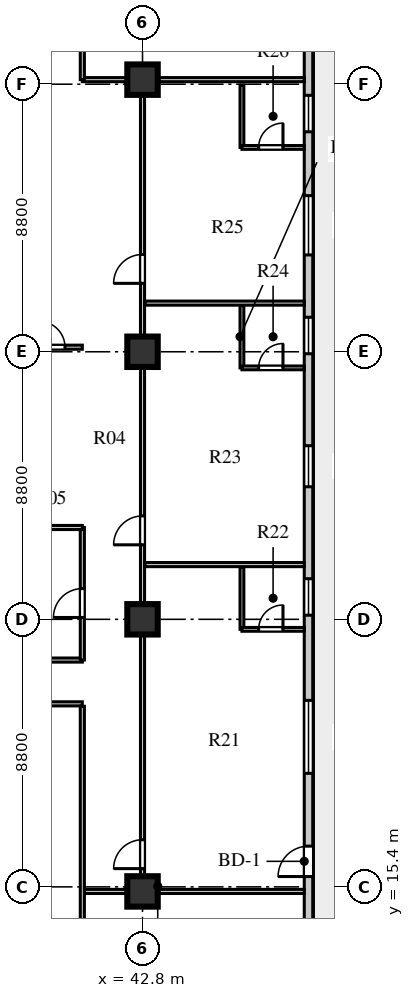
"""IFC4 building model, lengths in metres.
Left out: names, types, materials, properties, quantities, classifications, styles, units other than length and angle.
Written with IfcOpenShell. Run it as: python <this file> out.ifc"""

import sys

from ifc_helpers import new_model, si_unit, direction, frame, frame_2d, origin, origin_2d, place, context, subcontext, project, spatial, rectangle, extrude, element, fill, save


model = new_model("IFC4")
c1 = context("Model", 3, precision=1e-05, world=origin(), true_north=direction((0.0, 1.0)))
c2 = subcontext(c1, "Body", "Model", "MODEL_VIEW")
j1 = project(units=[si_unit("LENGTHUNIT", "METRE"), si_unit("PLANEANGLEUNIT", "RADIAN")], contexts=[c1])
p1 = place(None, origin())
s1 = spatial("IfcSite", under=j1, at=p1, CompositionType="ELEMENT")
p2 = place(p1, origin())
s2 = spatial("IfcBuilding", under=s1, at=p2, CompositionType="ELEMENT")
p3 = place(p2, frame((0.0, 0.0, 119.4)))
s3 = spatial("IfcBuildingStorey", under=s2, at=p3, CompositionType="ELEMENT", Elevation=119.4)
for number, where, z_axis, x_axis in (
    (1, (42.8, 15.25, 0.0), (0.0, 0.0, 1.0), (1.0, 0.0, 0.0)),
    (2, (42.8, 24.2, 0.0), (0.0, 0.0, 1.0), (1.0, 0.0, 0.0)),
    (3, (42.8, 33.0, 0.0), (0.0, 0.0, 1.0), (1.0, 0.0, 0.0)),
    (4, (42.8, 41.95, 0.0), (0.0, 0.0, 1.0), (1.0, 0.0, 0.0)),
):
    element("IfcColumn", number, at=place(p3, frame(where, z_axis=z_axis, x_axis=x_axis)), inside=s3, PredefinedType="COLUMN", context=c2, shape_type="SweptSolid", body=[
        extrude(rectangle(XDim=1.0, YDim=1.0, at=origin_2d()), origin(), (0.0, 0.0, 1.0), 3.6),
    ])
p4 = place(p3, frame((48.26, 13.33, 0.0), z_axis=(0.0, 0.0, 1.0), x_axis=(0.0, 1.0, 0.0)))
e5 = element("IfcWall", 5, at=p4, inside=s3, PredefinedType="STANDARD", context=c2, shape_type="SweptSolid", body=[
    extrude(rectangle(XDim=30.54, YDim=0.28, at=frame_2d((15.27, 0.0))), origin(), (0.0, 0.0, 1.0), 3.6),
])
p5 = place(p4, frame((2.41, 0.0, 0.0)))
e6 = element("IfcOpeningElement", 6, at=p5, cuts=e5, PredefinedType="OPENING", context=c2, shape_type="SweptSolid", body=[
    extrude(rectangle(XDim=1.0, YDim=2.05, at=frame_2d((0.5, 1.025))), frame((0.0, 0.15, 0.0), z_axis=(0.0, -1.0, 0.0), x_axis=(1.0, 0.0, 0.0)), (0.0, 0.0, 1.0), 0.3),
])
p6 = place(p4, frame((5.805, 0.0, 0.8)))
e7 = element("IfcOpeningElement", 7, at=p6, cuts=e5, PredefinedType="OPENING", context=c2, shape_type="SweptSolid", body=[
    extrude(rectangle(XDim=2.4, YDim=2.05, at=frame_2d((1.2, 1.025))), frame((0.0, 0.15, 0.0), z_axis=(0.0, -1.0, 0.0), x_axis=(1.0, 0.0, 0.0)), (0.0, 0.0, 1.0), 0.3),
])
p7 = place(p4, frame((11.005, 0.0, 0.8)))
e8 = element("IfcOpeningElement", 8, at=p7, cuts=e5, PredefinedType="OPENING", context=c2, shape_type="SweptSolid", body=[
    extrude(rectangle(XDim=1.2, YDim=1.75, at=frame_2d((0.6, 0.875))), frame((0.0, 0.15, 0.0), z_axis=(0.0, -1.0, 0.0), x_axis=(1.0, 0.0, 0.0)), (0.0, 0.0, 1.0), 0.3),
])
p8 = place(p4, frame((15.23, 0.0, 0.8)))
e9 = element("IfcOpeningElement", 9, at=p8, cuts=e5, PredefinedType="OPENING", context=c2, shape_type="SweptSolid", body=[
    extrude(rectangle(XDim=1.35, YDim=1.9, at=frame_2d((0.675, 0.95))), frame((0.0, 0.15, 0.0), z_axis=(0.0, -1.0, 0.0), x_axis=(1.0, 0.0, 0.0)), (0.0, 0.0, 1.0), 0.3),
])
p9 = place(p4, frame((19.605, 0.0, 0.8)))
e10 = element("IfcOpeningElement", 10, at=p9, cuts=e5, PredefinedType="OPENING", context=c2, shape_type="SweptSolid", body=[
    extrude(rectangle(XDim=1.2, YDim=1.75, at=frame_2d((0.6, 0.875))), frame((0.0, 0.15, 0.0), z_axis=(0.0, -1.0, 0.0), x_axis=(1.0, 0.0, 0.0)), (0.0, 0.0, 1.0), 0.3),
])
p10 = place(p4, frame((22.855, 0.0, 0.8)))
e11 = element("IfcOpeningElement", 11, at=p10, cuts=e5, PredefinedType="OPENING", context=c2, shape_type="SweptSolid", body=[
    extrude(rectangle(XDim=1.95, YDim=2.0, at=frame_2d((0.975, 1.0))), frame((0.0, 0.15, 0.0), z_axis=(0.0, -1.0, 0.0), x_axis=(1.0, 0.0, 0.0)), (0.0, 0.0, 1.0), 0.3),
])
p11 = place(p4, frame((26.905, 0.0, 0.8)))
e12 = element("IfcOpeningElement", 12, at=p11, cuts=e5, PredefinedType="OPENING", context=c2, shape_type="SweptSolid", body=[
    extrude(rectangle(XDim=1.2, YDim=1.75, at=frame_2d((0.6, 0.875))), frame((0.0, 0.15, 0.0), z_axis=(0.0, -1.0, 0.0), x_axis=(1.0, 0.0, 0.0)), (0.0, 0.0, 1.0), 0.3),
])
p12 = place(p3, frame((25.22, 21.42, 0.0), z_axis=(0.0, 0.0, 1.0), x_axis=(1.0, 0.0, 0.0)))
e13 = element("IfcWall", 13, at=p12, inside=s3, PredefinedType="PARTITIONING", context=c2, shape_type="SweptSolid", body=[
    extrude(rectangle(XDim=15.6, YDim=0.135, at=frame_2d((7.8, 0.0))), origin(), (0.0, 0.0, 1.0), 3.2),
])
p13 = place(p12, frame((0.73, 0.0, 0.0)))
e14 = element("IfcOpeningElement", 14, at=p13, cuts=e13, PredefinedType="OPENING", context=c2, shape_type="SweptSolid", body=[
    extrude(rectangle(XDim=0.95, YDim=2.1, at=frame_2d((0.475, 1.05))), frame((0.0, 0.078, 0.0), z_axis=(0.0, -1.0, 0.0), x_axis=(1.0, 0.0, 0.0)), (0.0, 0.0, 1.0), 0.155),
])
p14 = place(p12, frame((8.43, 0.0, 0.0)))
e15 = element("IfcOpeningElement", 15, at=p14, cuts=e13, PredefinedType="OPENING", context=c2, shape_type="SweptSolid", body=[
    extrude(rectangle(XDim=0.95, YDim=2.1, at=frame_2d((0.475, 1.05))), frame((0.0, 0.078, 0.0), z_axis=(0.0, -1.0, 0.0), x_axis=(1.0, 0.0, 0.0)), (0.0, 0.0, 1.0), 0.155),
])
p15 = place(p3, frame((27.15, 22.86, 0.0), z_axis=(0.0, 0.0, 1.0), x_axis=(1.0, 0.0, 0.0)))
e16 = element("IfcWall", 16, at=p15, inside=s3, PredefinedType="PARTITIONING", context=c2, shape_type="SweptSolid", body=[
    extrude(rectangle(XDim=13.67, YDim=0.135, at=frame_2d((6.835, 0.0))), origin(), (0.0, 0.0, 1.0), 3.6),
])
p16 = place(p15, frame((2.2, 0.0, 0.0)))
e17 = element("IfcOpeningElement", 17, at=p16, cuts=e16, PredefinedType="OPENING", context=c2, shape_type="SweptSolid", body=[
    extrude(rectangle(XDim=0.9, YDim=2.08, at=frame_2d((0.45, 1.04))), frame((0.0, 0.078, 0.0), z_axis=(0.0, -1.0, 0.0), x_axis=(1.0, 0.0, 0.0)), (0.0, 0.0, 1.0), 0.155),
])
p17 = place(p3, frame((42.8, 15.25, 0.0), z_axis=(0.0, 0.0, 1.0), x_axis=(0.0, 1.0, 0.0)))
e18 = element("IfcWall", 18, at=p17, inside=s3, PredefinedType="PARTITIONING", context=c2, shape_type="SweptSolid", body=[
    extrude(rectangle(XDim=26.7, YDim=0.135, at=frame_2d((13.35, 0.0))), origin(), (0.0, 0.0, 1.0), 2.95),
])
p18 = place(p17, frame((0.75, 0.0, 0.0)))
e19 = element("IfcOpeningElement", 19, at=p18, cuts=e18, PredefinedType="OPENING", context=c2, shape_type="SweptSolid", body=[
    extrude(rectangle(XDim=0.95, YDim=2.1, at=frame_2d((0.475, 1.05))), frame((0.0, 0.078, 0.0), z_axis=(0.0, -1.0, 0.0), x_axis=(1.0, 0.0, 0.0)), (0.0, 0.0, 1.0), 0.155),
])
p19 = place(p17, frame((11.4, 0.0, 0.0)))
e20 = element("IfcOpeningElement", 20, at=p19, cuts=e18, PredefinedType="OPENING", context=c2, shape_type="SweptSolid", body=[
    extrude(rectangle(XDim=0.95, YDim=2.1, at=frame_2d((0.475, 1.05))), frame((0.0, 0.078, 0.0), z_axis=(0.0, -1.0, 0.0), x_axis=(1.0, 0.0, 0.0)), (0.0, 0.0, 1.0), 0.155),
])
p20 = place(p17, frame((20.0, 0.0, 0.0)))
e21 = element("IfcOpeningElement", 21, at=p20, cuts=e18, PredefinedType="OPENING", context=c2, shape_type="SweptSolid", body=[
    extrude(rectangle(XDim=0.95, YDim=2.1, at=frame_2d((0.475, 1.05))), frame((0.0, 0.078, 0.0), z_axis=(0.0, -1.0, 0.0), x_axis=(1.0, 0.0, 0.0)), (0.0, 0.0, 1.0), 0.155),
])
for number, where, z_axis, x_axis in (
    (22, (40.82, 15.25, 0.0), (0.0, 0.0, 1.0), (1.0, 0.0, 0.0)),
    (23, (40.82, 41.95, 0.0), (0.0, 0.0, 1.0), (1.0, 0.0, 0.0)),
):
    element("IfcWall", number, at=place(p3, frame(where, z_axis=z_axis, x_axis=x_axis)), inside=s3, PredefinedType="PARTITIONING", context=c2, shape_type="SweptSolid", body=[
        extrude(rectangle(XDim=7.3, YDim=0.135, at=frame_2d((3.65, 0.0))), origin(), (0.0, 0.0, 1.0), 2.95),
    ])
p21 = place(p3, frame((40.82, 22.86, 0.0), z_axis=(0.0, 0.0, 1.0), x_axis=(0.0, 1.0, 0.0)))
e24 = element("IfcWall", 24, at=p21, inside=s3, PredefinedType="PARTITIONING", context=c2, shape_type="SweptSolid", body=[
    extrude(rectangle(XDim=4.36, YDim=0.135, at=frame_2d((2.18, 0.0))), origin(), (0.0, 0.0, 1.0), 3.6),
])
p22 = place(p21, frame((1.4, 0.0, 0.0)))
e25 = element("IfcOpeningElement", 25, at=p22, cuts=e24, PredefinedType="OPENING", context=c2, shape_type="SweptSolid", body=[
    extrude(rectangle(XDim=0.95, YDim=2.1, at=frame_2d((0.475, 1.05))), frame((0.0, 0.078, 0.0), z_axis=(0.0, -1.0, 0.0), x_axis=(1.0, 0.0, 0.0)), (0.0, 0.0, 1.0), 0.155),
])
p23 = place(p3, frame((36.9, 27.22, 0.0), z_axis=(0.0, 0.0, 1.0), x_axis=(1.0, 0.0, 0.0)))
e26 = element("IfcWall", 26, at=p23, inside=s3, PredefinedType="PARTITIONING", context=c2, shape_type="SweptSolid", body=[
    extrude(rectangle(XDim=3.92, YDim=0.135, at=frame_2d((1.96, 0.0))), origin(), (0.0, 0.0, 1.0), 3.2),
])
p24 = place(p3, frame((40.82, 10.28, 0.0), z_axis=(0.0, 0.0, 1.0), x_axis=(0.0, 1.0, 0.0)))
e27 = element("IfcWall", 27, at=p24, inside=s3, PredefinedType="PARTITIONING", context=c2, shape_type="SweptSolid", body=[
    extrude(rectangle(XDim=11.06, YDim=0.135, at=frame_2d((5.53, 0.0))), origin(), (0.0, 0.0, 1.0), 3.6),
])
p25 = place(p3, frame((46.07, 23.87, 0.0), z_axis=(0.0, 0.0, 1.0), x_axis=(0.0, 1.0, 0.0)))
e28 = element("IfcWall", 28, at=p25, inside=s3, PredefinedType="PLUMBINGWALL", context=c2, shape_type="SweptSolid", body=[
    extrude(rectangle(XDim=2.05, YDim=0.125, at=frame_2d((1.025, 0.0))), origin(), (0.0, 0.0, 1.0), 3.6),
])
p26 = place(p3, frame((46.07, 23.87, 0.0), z_axis=(0.0, 0.0, 1.0), x_axis=(1.0, 0.0, 0.0)))
e29 = element("IfcWall", 29, at=p26, inside=s3, PredefinedType="PLUMBINGWALL", context=c2, shape_type="SweptSolid", body=[
    extrude(rectangle(XDim=2.05, YDim=0.125, at=frame_2d((1.025, 0.0))), origin(), (0.0, 0.0, 1.0), 3.1),
])
p27 = place(p26, frame((0.55, 0.0, 0.0)))
e30 = element("IfcOpeningElement", 30, at=p27, cuts=e29, PredefinedType="OPENING", context=c2, shape_type="SweptSolid", body=[
    extrude(rectangle(XDim=0.8, YDim=2.05, at=frame_2d((0.4, 1.025))), frame((0.0, 0.073, 0.0), z_axis=(0.0, -1.0, 0.0), x_axis=(1.0, 0.0, 0.0)), (0.0, 0.0, 1.0), 0.145),
])
p28 = place(p3, frame((42.88, 26.0, 0.0), z_axis=(0.0, 0.0, 1.0), x_axis=(1.0, 0.0, 0.0)))
e31 = element("IfcWall", 31, at=p28, inside=s3, PredefinedType="PARTITIONING", context=c2, shape_type="SweptSolid", body=[
    extrude(rectangle(XDim=5.24, YDim=0.135, at=frame_2d((2.62, 0.0))), origin(), (0.0, 0.0, 1.0), 3.6),
])
p29 = place(p3, frame((46.07, 32.47, 0.0), z_axis=(0.0, 0.0, 1.0), x_axis=(0.0, 1.0, 0.0)))
e32 = element("IfcWall", 32, at=p29, inside=s3, PredefinedType="PLUMBINGWALL", context=c2, shape_type="SweptSolid", body=[
    extrude(rectangle(XDim=2.05, YDim=0.125, at=frame_2d((1.025, 0.0))), origin(), (0.0, 0.0, 1.0), 3.6),
])
p30 = place(p3, frame((46.07, 32.47, 0.0), z_axis=(0.0, 0.0, 1.0), x_axis=(1.0, 0.0, 0.0)))
e33 = element("IfcWall", 33, at=p30, inside=s3, PredefinedType="PLUMBINGWALL", context=c2, shape_type="SweptSolid", body=[
    extrude(rectangle(XDim=2.05, YDim=0.125, at=frame_2d((1.025, 0.0))), origin(), (0.0, 0.0, 1.0), 3.6),
])
p31 = place(p30, frame((0.55, 0.0, 0.0)))
e34 = element("IfcOpeningElement", 34, at=p31, cuts=e33, PredefinedType="OPENING", context=c2, shape_type="SweptSolid", body=[
    extrude(rectangle(XDim=0.8, YDim=2.05, at=frame_2d((0.4, 1.025))), frame((0.0, 0.073, 0.0), z_axis=(0.0, -1.0, 0.0), x_axis=(1.0, 0.0, 0.0)), (0.0, 0.0, 1.0), 0.145),
])
p32 = place(p3, frame((42.88, 34.6, 0.0), z_axis=(0.0, 0.0, 1.0), x_axis=(1.0, 0.0, 0.0)))
e35 = element("IfcWall", 35, at=p32, inside=s3, PredefinedType="PARTITIONING", context=c2, shape_type="SweptSolid", body=[
    extrude(rectangle(XDim=5.24, YDim=0.135, at=frame_2d((2.62, 0.0))), origin(), (0.0, 0.0, 1.0), 3.6),
])
p33 = place(p3, frame((46.07, 39.72, 0.0), z_axis=(0.0, 0.0, 1.0), x_axis=(0.0, 1.0, 0.0)))
e36 = element("IfcWall", 36, at=p33, inside=s3, PredefinedType="PLUMBINGWALL", context=c2, shape_type="SweptSolid", body=[
    extrude(rectangle(XDim=2.05, YDim=0.125, at=frame_2d((1.025, 0.0))), origin(), (0.0, 0.0, 1.0), 3.6),
])
p34 = place(p3, frame((46.07, 39.72, 0.0), z_axis=(0.0, 0.0, 1.0), x_axis=(1.0, 0.0, 0.0)))
e37 = element("IfcWall", 37, at=p34, inside=s3, PredefinedType="PLUMBINGWALL", context=c2, shape_type="SweptSolid", body=[
    extrude(rectangle(XDim=2.05, YDim=0.125, at=frame_2d((1.025, 0.0))), origin(), (0.0, 0.0, 1.0), 3.6),
])
p35 = place(p34, frame((0.55, 0.0, 0.0)))
e38 = element("IfcOpeningElement", 38, at=p35, cuts=e37, PredefinedType="OPENING", context=c2, shape_type="SweptSolid", body=[
    extrude(rectangle(XDim=0.8, YDim=2.05, at=frame_2d((0.4, 1.025))), frame((0.0, 0.073, 0.0), z_axis=(0.0, -1.0, 0.0), x_axis=(1.0, 0.0, 0.0)), (0.0, 0.0, 1.0), 0.145),
])
p36 = place(p3, frame((38.95, 33.15, 0.0), z_axis=(0.0, 0.0, 1.0), x_axis=(1.0, 0.0, 0.0)))
e39 = element("IfcWall", 39, at=p36, inside=s3, PredefinedType="PARTITIONING", context=c2, shape_type="SweptSolid", body=[
    extrude(rectangle(XDim=1.87, YDim=0.135, at=frame_2d((0.935, 0.0))), origin(), (0.0, 0.0, 1.0), 3.6),
])
p37 = place(p36, frame((0.45, 0.0, 0.0)))
e40 = element("IfcOpeningElement", 40, at=p37, cuts=e39, PredefinedType="OPENING", context=c2, shape_type="SweptSolid", body=[
    extrude(rectangle(XDim=0.85, YDim=2.05, at=frame_2d((0.425, 1.025))), frame((0.0, 0.078, 0.0), z_axis=(0.0, -1.0, 0.0), x_axis=(1.0, 0.0, 0.0)), (0.0, 0.0, 1.0), 0.155),
])
p38 = place(p3, frame((40.82, 41.95, 0.0), z_axis=(0.0, 0.0, 1.0), x_axis=(0.0, 1.0, 0.0)))
e41 = element("IfcWall", 41, at=p38, inside=s3, PredefinedType="PARTITIONING", context=c2, shape_type="SweptSolid", body=[
    extrude(rectangle(XDim=4.97, YDim=0.135, at=frame_2d((2.485, 0.0))), origin(), (0.0, 0.0, 1.0), 3.6),
])
p39 = place(p5, frame((1.0, 0.0, 0.0), z_axis=(0.0, 0.0, 1.0), x_axis=(-1.0, 0.0, 0.0)))
e42 = element("IfcDoor", 42, at=p39, inside=s3, OperationType="SINGLE_SWING_RIGHT", PredefinedType="DOOR", context=c2, shape_type="SweptSolid", body=[
    extrude(rectangle(XDim=1.0, YDim=2.05, at=frame_2d((0.5, 1.025))), frame((0.0, 0.025, 0.0), z_axis=(0.0, -1.0, 0.0), x_axis=(1.0, 0.0, 0.0)), (0.0, 0.0, 1.0), 0.05),
])
fill(e6, e42)
p40 = place(p6, origin())
e43 = element("IfcWindow", 43, at=p40, inside=s3, PartitioningType="SINGLE_PANEL", PredefinedType="WINDOW", context=c2, shape_type="SweptSolid", body=[
    extrude(rectangle(XDim=2.4, YDim=2.05, at=frame_2d((1.2, 1.025))), frame((0.0, 0.03, 0.0), z_axis=(0.0, -1.0, 0.0), x_axis=(1.0, 0.0, 0.0)), (0.0, 0.0, 1.0), 0.06),
])
fill(e7, e43)
p41 = place(p7, origin())
e44 = element("IfcWindow", 44, at=p41, inside=s3, PartitioningType="SINGLE_PANEL", PredefinedType="WINDOW", context=c2, shape_type="SweptSolid", body=[
    extrude(rectangle(XDim=1.2, YDim=1.75, at=frame_2d((0.6, 0.875))), frame((0.0, 0.03, 0.0), z_axis=(0.0, -1.0, 0.0), x_axis=(1.0, 0.0, 0.0)), (0.0, 0.0, 1.0), 0.06),
])
fill(e8, e44)
p42 = place(p8, origin())
e45 = element("IfcWindow", 45, at=p42, inside=s3, PartitioningType="SINGLE_PANEL", PredefinedType="WINDOW", context=c2, shape_type="SweptSolid", body=[
    extrude(rectangle(XDim=1.35, YDim=1.9, at=frame_2d((0.675, 0.95))), frame((0.0, 0.03, 0.0), z_axis=(0.0, -1.0, 0.0), x_axis=(1.0, 0.0, 0.0)), (0.0, 0.0, 1.0), 0.06),
])
fill(e9, e45)
p43 = place(p9, origin())
e46 = element("IfcWindow", 46, at=p43, inside=s3, PartitioningType="SINGLE_PANEL", PredefinedType="WINDOW", context=c2, shape_type="SweptSolid", body=[
    extrude(rectangle(XDim=1.2, YDim=1.75, at=frame_2d((0.6, 0.875))), frame((0.0, 0.03, 0.0), z_axis=(0.0, -1.0, 0.0), x_axis=(1.0, 0.0, 0.0)), (0.0, 0.0, 1.0), 0.06),
])
fill(e10, e46)
p44 = place(p10, origin())
e47 = element("IfcWindow", 47, at=p44, inside=s3, PartitioningType="SINGLE_PANEL", PredefinedType="WINDOW", context=c2, shape_type="SweptSolid", body=[
    extrude(rectangle(XDim=1.95, YDim=2.0, at=frame_2d((0.975, 1.0))), frame((0.0, 0.03, 0.0), z_axis=(0.0, -1.0, 0.0), x_axis=(1.0, 0.0, 0.0)), (0.0, 0.0, 1.0), 0.06),
])
fill(e11, e47)
p45 = place(p11, origin())
e48 = element("IfcWindow", 48, at=p45, inside=s3, PartitioningType="SINGLE_PANEL", PredefinedType="WINDOW", context=c2, shape_type="SweptSolid", body=[
    extrude(rectangle(XDim=1.2, YDim=1.75, at=frame_2d((0.6, 0.875))), frame((0.0, 0.03, 0.0), z_axis=(0.0, -1.0, 0.0), x_axis=(1.0, 0.0, 0.0)), (0.0, 0.0, 1.0), 0.06),
])
fill(e12, e48)
p46 = place(p22, frame((0.95, 0.0, 0.0), z_axis=(0.0, 0.0, 1.0), x_axis=(-1.0, 0.0, 0.0)))
e49 = element("IfcDoor", 49, at=p46, inside=s3, OperationType="SINGLE_SWING_RIGHT", PredefinedType="DOOR", context=c2, shape_type="SweptSolid", body=[
    extrude(rectangle(XDim=0.95, YDim=2.1, at=frame_2d((0.475, 1.05))), frame((0.0, 0.025, 0.0), z_axis=(0.0, -1.0, 0.0), x_axis=(1.0, 0.0, 0.0)), (0.0, 0.0, 1.0), 0.05),
])
fill(e25, e49)
p47 = place(p18, origin())
e50 = element("IfcDoor", 50, at=p47, inside=s3, OperationType="SINGLE_SWING_LEFT", PredefinedType="DOOR", context=c2, shape_type="SweptSolid", body=[
    extrude(rectangle(XDim=0.95, YDim=2.1, at=frame_2d((0.475, 1.05))), frame((0.0, 0.025, 0.0), z_axis=(0.0, -1.0, 0.0), x_axis=(1.0, 0.0, 0.0)), (0.0, 0.0, 1.0), 0.05),
])
fill(e19, e50)
p48 = place(p27, frame((0.8, 0.0, 0.0), z_axis=(0.0, 0.0, 1.0), x_axis=(-1.0, 0.0, 0.0)))
e51 = element("IfcDoor", 51, at=p48, inside=s3, OperationType="SINGLE_SWING_LEFT", PredefinedType="DOOR", context=c2, shape_type="SweptSolid", body=[
    extrude(rectangle(XDim=0.8, YDim=2.05, at=frame_2d((0.4, 1.025))), frame((0.0, 0.025, 0.0), z_axis=(0.0, -1.0, 0.0), x_axis=(1.0, 0.0, 0.0)), (0.0, 0.0, 1.0), 0.05),
])
fill(e30, e51)
p49 = place(p19, origin())
e52 = element("IfcDoor", 52, at=p49, inside=s3, OperationType="SINGLE_SWING_LEFT", PredefinedType="DOOR", context=c2, shape_type="SweptSolid", body=[
    extrude(rectangle(XDim=0.95, YDim=2.1, at=frame_2d((0.475, 1.05))), frame((0.0, 0.025, 0.0), z_axis=(0.0, -1.0, 0.0), x_axis=(1.0, 0.0, 0.0)), (0.0, 0.0, 1.0), 0.05),
])
fill(e20, e52)
p50 = place(p31, frame((0.8, 0.0, 0.0), z_axis=(0.0, 0.0, 1.0), x_axis=(-1.0, 0.0, 0.0)))
e53 = element("IfcDoor", 53, at=p50, inside=s3, OperationType="SINGLE_SWING_LEFT", PredefinedType="DOOR", context=c2, shape_type="SweptSolid", body=[
    extrude(rectangle(XDim=0.8, YDim=2.05, at=frame_2d((0.4, 1.025))), frame((0.0, 0.025, 0.0), z_axis=(0.0, -1.0, 0.0), x_axis=(1.0, 0.0, 0.0)), (0.0, 0.0, 1.0), 0.05),
])
fill(e34, e53)
p51 = place(p20, origin())
e54 = element("IfcDoor", 54, at=p51, inside=s3, OperationType="SINGLE_SWING_LEFT", PredefinedType="DOOR", context=c2, shape_type="SweptSolid", body=[
    extrude(rectangle(XDim=0.95, YDim=2.1, at=frame_2d((0.475, 1.05))), frame((0.0, 0.025, 0.0), z_axis=(0.0, -1.0, 0.0), x_axis=(1.0, 0.0, 0.0)), (0.0, 0.0, 1.0), 0.05),
])
fill(e21, e54)
p52 = place(p35, frame((0.8, 0.0, 0.0), z_axis=(0.0, 0.0, 1.0), x_axis=(-1.0, 0.0, 0.0)))
e55 = element("IfcDoor", 55, at=p52, inside=s3, OperationType="SINGLE_SWING_LEFT", PredefinedType="DOOR", context=c2, shape_type="SweptSolid", body=[
    extrude(rectangle(XDim=0.8, YDim=2.05, at=frame_2d((0.4, 1.025))), frame((0.0, 0.025, 0.0), z_axis=(0.0, -1.0, 0.0), x_axis=(1.0, 0.0, 0.0)), (0.0, 0.0, 1.0), 0.05),
])
fill(e38, e55)
p53 = place(p37, origin())
e56 = element("IfcDoor", 56, at=p53, inside=s3, OperationType="SINGLE_SWING_LEFT", PredefinedType="DOOR", context=c2, shape_type="SweptSolid", body=[
    extrude(rectangle(XDim=0.85, YDim=2.05, at=frame_2d((0.425, 1.025))), frame((0.0, 0.025, 0.0), z_axis=(0.0, -1.0, 0.0), x_axis=(1.0, 0.0, 0.0)), (0.0, 0.0, 1.0), 0.05),
])
fill(e40, e56)
save(model, sys.argv[1])
